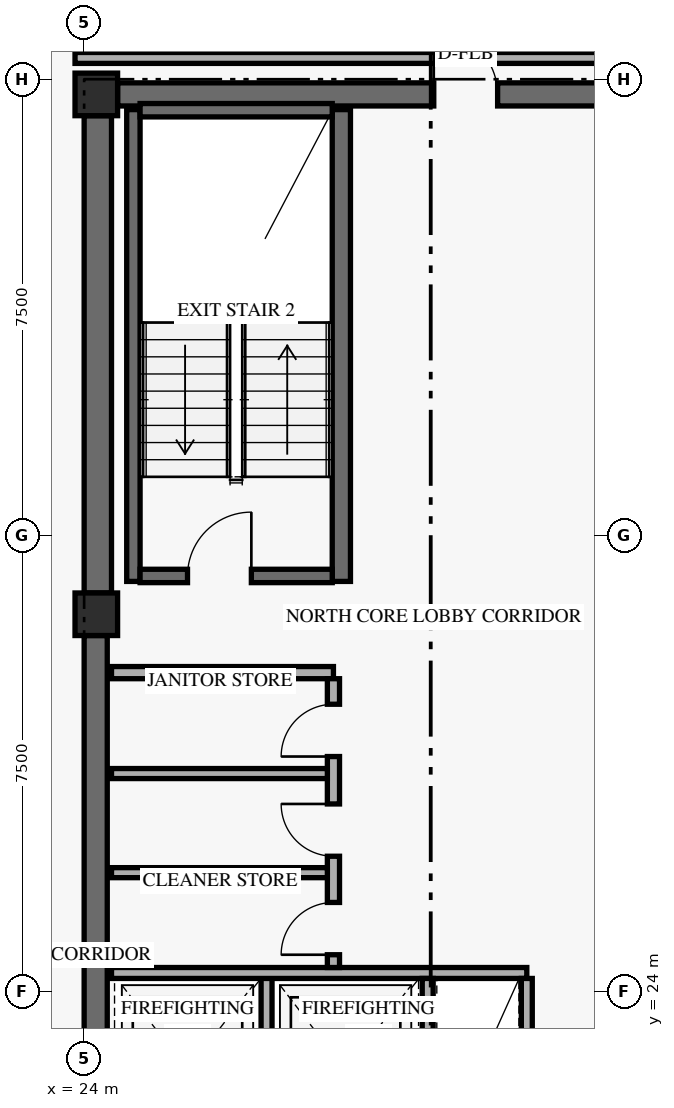
"""IFC4 building model, lengths in metres.
Left out: names, types, materials, properties, quantities, classifications, styles, units other than length and angle.
Written with IfcOpenShell. Run it as: python <this file> out.ifc"""

import sys

from ifc_helpers import new_model, si_unit, direction, frame, frame_2d, origin, origin_2d, place, context, subcontext, project, spatial, rectangle, extrude, element, fill, save


model = new_model("IFC4")
c1 = context("Model", 3, precision=1e-05, world=origin(), true_north=direction((0.0, 1.0)))
c2 = subcontext(c1, "Body", "Model", "MODEL_VIEW")
j1 = project(units=[si_unit("LENGTHUNIT", "METRE"), si_unit("PLANEANGLEUNIT", "RADIAN")], contexts=[c1])
p1 = place(None, origin())
s1 = spatial("IfcSite", under=j1, at=p1, CompositionType="ELEMENT")
p2 = place(p1, origin())
s2 = spatial("IfcBuilding", under=s1, at=p2, CompositionType="ELEMENT")
p3 = place(p2, frame((0.0, 0.0, 162.6)))
s3 = spatial("IfcBuildingStorey", under=s2, at=p3, CompositionType="ELEMENT", Elevation=162.6)
p4 = place(p3, frame((24.19, 17.9, 0.0), z_axis=(0.0, 0.0, 1.0), x_axis=(0.0, 1.0, 0.0)))
e1 = element("IfcWall", 1, at=p4, inside=s3, PredefinedType="SHEAR", context=c2, shape_type="SweptSolid", body=[
    extrude(rectangle(XDim=11.95, YDim=0.38, at=frame_2d((5.975, 0.0))), origin(), (0.0, 0.0, 1.0), 2.748),
])
p5 = place(p3, frame((24.225, 30.55, 0.0), z_axis=(0.0, 0.0, 1.0), x_axis=(0.0, 1.0, 0.0)))
e2 = element("IfcWall", 2, at=p5, inside=s3, PredefinedType="SHEAR", context=c2, shape_type="SweptSolid", body=[
    extrude(rectangle(XDim=7.85, YDim=0.45, at=frame_2d((3.925, 0.0))), origin(), (0.0, 0.0, 1.0), 2.748),
])
p6 = place(p3, frame((24.55, 38.75, 0.0), z_axis=(0.0, 0.0, 1.0), x_axis=(1.0, 0.0, 0.0)))
e3 = element("IfcWall", 3, at=p6, inside=s3, PredefinedType="SHEAR", context=c2, shape_type="SweptSolid", body=[
    extrude(rectangle(XDim=10.3, YDim=0.38, at=frame_2d((5.15, 0.0))), origin(), (0.0, 0.0, 1.0), 3.36),
])
p7 = place(p6, frame((5.2, 0.0, 0.0)))
e4 = element("IfcOpeningElement", 4, at=p7, cuts=e3, PredefinedType="OPENING", context=c2, shape_type="SweptSolid", body=[
    extrude(rectangle(XDim=1.05, YDim=2.15, at=frame_2d((0.525, 1.075))), frame((0.0, 0.2, 0.0), z_axis=(0.0, -1.0, 0.0), x_axis=(1.0, 0.0, 0.0)), (0.0, 0.0, 1.0), 0.4),
])
p8 = place(p3, frame((24.81, 30.74, 0.0), z_axis=(0.0, 0.0, 1.0), x_axis=(0.0, 1.0, 0.0)))
e5 = element("IfcWall", 5, at=p8, inside=s3, PredefinedType="SHEAR", context=c2, shape_type="SweptSolid", body=[
    extrude(rectangle(XDim=7.76, YDim=0.22, at=frame_2d((3.88, 0.0))), origin(), (0.0, 0.0, 1.0), 3.36),
])
p9 = place(p3, frame((28.23, 30.74, 0.0), z_axis=(0.0, 0.0, 1.0), x_axis=(0.0, 1.0, 0.0)))
e6 = element("IfcWall", 6, at=p9, inside=s3, PredefinedType="SHEAR", context=c2, shape_type="SweptSolid", body=[
    extrude(rectangle(XDim=7.76, YDim=0.3, at=frame_2d((3.88, 0.0))), origin(), (0.0, 0.0, 1.0), 3.36),
])
p10 = place(p3, frame((24.92, 30.83, 0.0), z_axis=(0.0, 0.0, 1.0), x_axis=(1.0, 0.0, 0.0)))
e7 = element("IfcWall", 7, at=p10, inside=s3, PredefinedType="SHEAR", context=c2, shape_type="SweptSolid", body=[
    extrude(rectangle(XDim=3.16, YDim=0.22, at=frame_2d((1.58, 0.0))), origin(), (0.0, 0.0, 1.0), 3.36),
])
p11 = place(p10, frame((0.78, 0.0, 0.0)))
e8 = element("IfcOpeningElement", 8, at=p11, cuts=e7, PredefinedType="OPENING", context=c2, shape_type="SweptSolid", body=[
    extrude(rectangle(XDim=1.05, YDim=2.15, at=frame_2d((0.525, 1.075))), frame((0.0, 0.12, 0.0), z_axis=(0.0, -1.0, 0.0), x_axis=(1.0, 0.0, 0.0)), (0.0, 0.0, 1.0), 0.24),
])
p12 = place(p3, frame((24.92, 38.49, 0.0), z_axis=(0.0, 0.0, 1.0), x_axis=(1.0, 0.0, 0.0)))
e9 = element("IfcWall", 9, at=p12, inside=s3, PredefinedType="SHEAR", context=c2, shape_type="SweptSolid", body=[
    extrude(rectangle(XDim=3.16, YDim=0.22, at=frame_2d((1.58, 0.0))), origin(), (0.0, 0.0, 1.0), 3.36),
])
for number, where, z_axis, x_axis in (
    (10, (24.2, 30.2, 0.0), (0.0, 0.0, 1.0), (1.0, 0.0, 0.0)),
    (11, (24.2, 38.75, 0.0), (0.0, 0.0, 1.0), (1.0, 0.0, 0.0)),
):
    element("IfcColumn", number, at=place(p3, frame(where, z_axis=z_axis, x_axis=x_axis)), inside=s3, PredefinedType="COLUMN", context=c2, shape_type="SweptSolid", body=[
        extrude(rectangle(XDim=0.7, YDim=0.7, at=origin_2d()), origin(), (0.0, 0.0, 1.0), 3.6),
    ])
p13 = place(p3, frame((27.0, 21.19, 0.0), z_axis=(0.0, 0.0, 1.0), x_axis=(0.0, 1.0, 0.0)))
e12 = element("IfcWall", 12, at=p13, inside=s3, PredefinedType="STANDARD", context=c2, shape_type="SweptSolid", body=[
    extrude(rectangle(XDim=3.11, YDim=0.18, at=frame_2d((1.555, 0.0))), origin(), (0.0, 0.0, 1.0), 3.36),
])
p14 = place(p3, frame((24.45, 24.3, 0.0), z_axis=(0.0, 0.0, 1.0), x_axis=(1.0, 0.0, 0.0)))
e13 = element("IfcWall", 13, at=p14, inside=s3, PredefinedType="STANDARD", context=c2, shape_type="SweptSolid", body=[
    extrude(rectangle(XDim=6.83, YDim=0.18, at=frame_2d((3.415, 0.0))), origin(), (0.0, 0.0, 1.0), 3.36),
])
for number, where, z_axis, x_axis in (
    (14, (29.65, 21.19, 0.0), (0.0, 0.0, 1.0), (0.0, 1.0, 0.0)),
    (15, (31.28, 21.19, 0.0), (0.0, 0.0, 1.0), (0.0, 1.0, 0.0)),
):
    element("IfcWall", number, at=place(p3, frame(where, z_axis=z_axis, x_axis=x_axis)), inside=s3, PredefinedType="STANDARD", context=c2, shape_type="SweptSolid", body=[
        extrude(rectangle(XDim=3.02, YDim=0.18, at=frame_2d((1.51, 0.0))), origin(), (0.0, 0.0, 1.0), 3.36),
    ])
p15 = place(p3, frame((24.45, 29.24, 0.0), z_axis=(0.0, 0.0, 1.0), x_axis=(1.0, 0.0, 0.0)))
e16 = element("IfcWall", 16, at=p15, inside=s3, PredefinedType="STANDARD", context=c2, shape_type="SweptSolid", body=[
    extrude(rectangle(XDim=3.65, YDim=0.2, at=frame_2d((1.825, 0.0))), origin(), (0.0, 0.0, 1.0), 3.36),
])
p16 = place(p3, frame((28.1, 24.39, 0.0), z_axis=(0.0, 0.0, 1.0), x_axis=(0.0, 1.0, 0.0)))
e17 = element("IfcWall", 17, at=p16, inside=s3, PredefinedType="STANDARD", context=c2, shape_type="SweptSolid", body=[
    extrude(rectangle(XDim=4.75, YDim=0.2, at=frame_2d((2.375, 0.0))), origin(), (0.0, 0.0, 1.0), 3.36),
])
p17 = place(p16, frame((0.21, 0.0, 0.0)))
e18 = element("IfcOpeningElement", 18, at=p17, cuts=e17, PredefinedType="OPENING", context=c2, shape_type="SweptSolid", body=[
    extrude(rectangle(XDim=0.86, YDim=2.1, at=frame_2d((0.43, 1.05))), frame((0.0, 0.11, 0.0), z_axis=(0.0, -1.0, 0.0), x_axis=(1.0, 0.0, 0.0)), (0.0, 0.0, 1.0), 0.22),
])
p18 = place(p16, frame((1.83, 0.0, 0.0)))
e19 = element("IfcOpeningElement", 19, at=p18, cuts=e17, PredefinedType="OPENING", context=c2, shape_type="SweptSolid", body=[
    extrude(rectangle(XDim=0.86, YDim=2.1, at=frame_2d((0.43, 1.05))), frame((0.0, 0.11, 0.0), z_axis=(0.0, -1.0, 0.0), x_axis=(1.0, 0.0, 0.0)), (0.0, 0.0, 1.0), 0.22),
])
p19 = place(p16, frame((3.47, 0.0, 0.0)))
e20 = element("IfcOpeningElement", 20, at=p19, cuts=e17, PredefinedType="OPENING", context=c2, shape_type="SweptSolid", body=[
    extrude(rectangle(XDim=0.86, YDim=2.1, at=frame_2d((0.43, 1.05))), frame((0.0, 0.11, 0.0), z_axis=(0.0, -1.0, 0.0), x_axis=(1.0, 0.0, 0.0)), (0.0, 0.0, 1.0), 0.22),
])
for number, where, z_axis, x_axis in (
    (21, (24.45, 25.95, 0.0), (0.0, 0.0, 1.0), (1.0, 0.0, 0.0)),
    (22, (24.45, 27.58, 0.0), (0.0, 0.0, 1.0), (1.0, 0.0, 0.0)),
):
    element("IfcWall", number, at=place(p3, frame(where, z_axis=z_axis, x_axis=x_axis)), inside=s3, PredefinedType="PARTITIONING", context=c2, shape_type="SweptSolid", body=[
        extrude(rectangle(XDim=3.55, YDim=0.165, at=frame_2d((1.775, 0.0))), origin(), (0.0, 0.0, 1.0), 3.36),
    ])
p20 = place(p3, frame((23.85, 39.35, 0.0), z_axis=(0.0, 0.0, 1.0), x_axis=(1.0, 0.0, 0.0)))
e23 = element("IfcWall", 23, at=p20, inside=s3, PredefinedType="STANDARD", context=c2, shape_type="SweptSolid", body=[
    extrude(rectangle(XDim=11.57, YDim=0.18, at=frame_2d((5.785, 0.0))), origin(), (0.0, 0.0, 1.0), 2.73),
])
p21 = place(p11, origin())
e24 = element("IfcDoor", 24, at=p21, inside=s3, OperationType="SINGLE_SWING_RIGHT", PredefinedType="DOOR", context=c2, shape_type="SweptSolid", body=[
    extrude(rectangle(XDim=1.05, YDim=2.15, at=frame_2d((0.525, 1.075))), frame((0.0, 0.025, 0.0), z_axis=(0.0, -1.0, 0.0), x_axis=(1.0, 0.0, 0.0)), (0.0, 0.0, 1.0), 0.05),
])
fill(e8, e24)
p22 = place(p17, origin())
e25 = element("IfcDoor", 25, at=p22, inside=s3, OperationType="SINGLE_SWING_LEFT", PredefinedType="DOOR", context=c2, shape_type="SweptSolid", body=[
    extrude(rectangle(XDim=0.86, YDim=2.1, at=frame_2d((0.43, 1.05))), frame((0.0, 0.025, 0.0), z_axis=(0.0, -1.0, 0.0), x_axis=(1.0, 0.0, 0.0)), (0.0, 0.0, 1.0), 0.05),
])
fill(e18, e25)
p23 = place(p18, origin())
e26 = element("IfcDoor", 26, at=p23, inside=s3, OperationType="SINGLE_SWING_RIGHT", PredefinedType="DOOR", context=c2, shape_type="SweptSolid", body=[
    extrude(rectangle(XDim=0.86, YDim=2.1, at=frame_2d((0.43, 1.05))), frame((0.0, 0.025, 0.0), z_axis=(0.0, -1.0, 0.0), x_axis=(1.0, 0.0, 0.0)), (0.0, 0.0, 1.0), 0.05),
])
fill(e19, e26)
p24 = place(p19, origin())
e27 = element("IfcDoor", 27, at=p24, inside=s3, OperationType="SINGLE_SWING_LEFT", PredefinedType="DOOR", context=c2, shape_type="SweptSolid", body=[
    extrude(rectangle(XDim=0.86, YDim=2.1, at=frame_2d((0.43, 1.05))), frame((0.0, 0.025, 0.0), z_axis=(0.0, -1.0, 0.0), x_axis=(1.0, 0.0, 0.0)), (0.0, 0.0, 1.0), 0.05),
])
fill(e20, e27)
p25 = place(p7, frame((1.05, 0.0, 0.0), z_axis=(0.0, 0.0, 1.0), x_axis=(-1.0, 0.0, 0.0)))
e28 = element("IfcDoor", 28, at=p25, inside=s3, OperationType="SINGLE_SWING_RIGHT", PredefinedType="DOOR", context=c2, shape_type="SweptSolid", body=[
    extrude(rectangle(XDim=1.05, YDim=2.15, at=frame_2d((0.525, 1.075))), frame((0.0, 0.025, 0.0), z_axis=(0.0, -1.0, 0.0), x_axis=(1.0, 0.0, 0.0)), (0.0, 0.0, 1.0), 0.05),
])
fill(e4, e28)
save(model, sys.argv[1])
